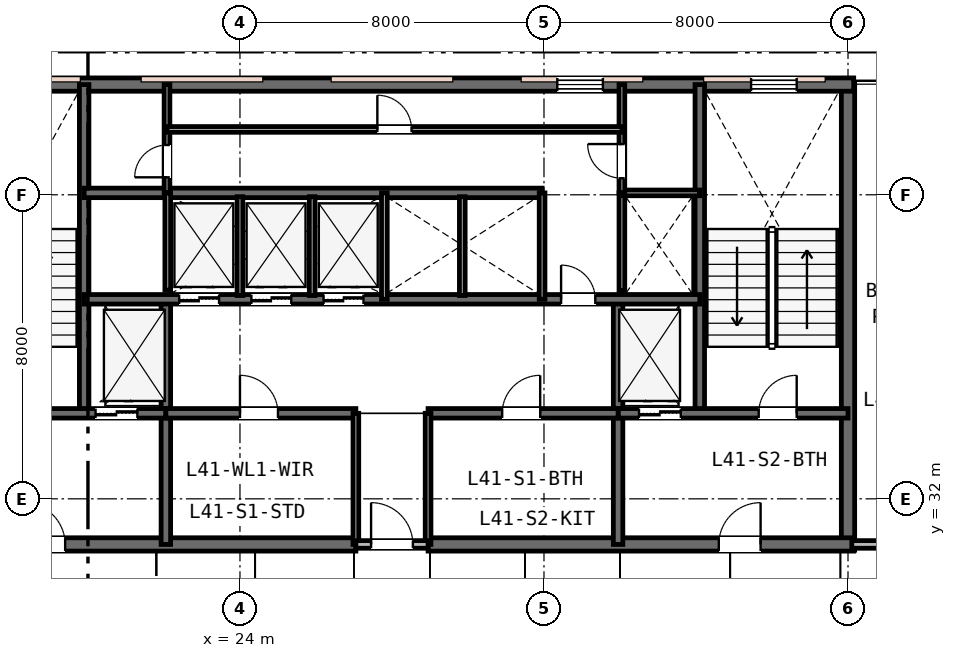
"""IFC4 building model, lengths in metres.
Left out: names, types, materials, properties, quantities, classifications, styles, units other than length and angle.
Written with IfcOpenShell. Run it as: python <this file> out.ifc"""

import sys

from ifc_helpers import new_model, si_unit, direction, frame, frame_2d, origin, place, context, subcontext, project, spatial, rectangle, extrude, element, fill, save


model = new_model("IFC4")
c1 = context("Model", 3, precision=1e-05, world=origin(), true_north=direction((0.0, 1.0)))
c2 = subcontext(c1, "Body", "Model", "MODEL_VIEW")
j1 = project(units=[si_unit("LENGTHUNIT", "METRE"), si_unit("PLANEANGLEUNIT", "RADIAN")], contexts=[c1])
p1 = place(None, origin())
s1 = spatial("IfcSite", under=j1, at=p1, CompositionType="ELEMENT")
p2 = place(p1, origin())
s2 = spatial("IfcBuilding", under=s1, at=p2, CompositionType="ELEMENT")
p3 = place(p2, frame((0.0, 0.0, 161.4)))
s3 = spatial("IfcBuildingStorey", under=s2, at=p3, CompositionType="ELEMENT", Elevation=161.4)
p4 = place(p3, frame((40.0, 30.65, 0.0), z_axis=(0.0, 0.0, 1.0), x_axis=(0.0, 1.0, 0.0)))
e1 = element("IfcWall", 1, at=p4, inside=s3, PredefinedType="SHEAR", context=c2, shape_type="SweptSolid", body=[
    extrude(rectangle(XDim=12.3, YDim=0.35, at=frame_2d((6.15, 0.0))), origin(), (0.0, 0.0, 1.0), 3.6),
])
p5 = place(p3, frame((15.85, 42.9, 0.0), z_axis=(0.0, 0.0, 1.0), x_axis=(1.0, 0.0, 0.0)))
e2 = element("IfcWall", 2, at=p5, inside=s3, PredefinedType="SHEAR", context=c2, shape_type="SweptSolid", body=[
    extrude(rectangle(XDim=24.3, YDim=0.35, at=frame_2d((12.15, 0.0))), origin(), (0.0, 0.0, 1.0), 3.6),
])
p6 = place(p5, frame((1.6, 0.0, 0.95)))
e3 = element("IfcOpeningElement", 3, at=p6, cuts=e2, PredefinedType="OPENING", context=c2, shape_type="SweptSolid", body=[
    extrude(rectangle(XDim=1.2, YDim=1.6, at=frame_2d((0.6, 0.8))), frame((0.0, 0.185, 0.0), z_axis=(0.0, -1.0, 0.0), x_axis=(1.0, 0.0, 0.0)), (0.0, 0.0, 1.0), 0.37),
])
p7 = place(p5, frame((16.5, 0.0, 0.95)))
e4 = element("IfcOpeningElement", 4, at=p7, cuts=e2, PredefinedType="OPENING", context=c2, shape_type="SweptSolid", body=[
    extrude(rectangle(XDim=1.2, YDim=1.6, at=frame_2d((0.6, 0.8))), frame((0.0, 0.185, 0.0), z_axis=(0.0, -1.0, 0.0), x_axis=(1.0, 0.0, 0.0)), (0.0, 0.0, 1.0), 0.37),
])
p8 = place(p5, frame((21.6, 0.0, 0.95)))
e5 = element("IfcOpeningElement", 5, at=p8, cuts=e2, PredefinedType="OPENING", context=c2, shape_type="SweptSolid", body=[
    extrude(rectangle(XDim=1.2, YDim=1.6, at=frame_2d((0.6, 0.8))), frame((0.0, 0.185, 0.0), z_axis=(0.0, -1.0, 0.0), x_axis=(1.0, 0.0, 0.0)), (0.0, 0.0, 1.0), 0.37),
])
p9 = place(p3, frame((15.85, 30.8, 0.0), z_axis=(0.0, 0.0, 1.0), x_axis=(1.0, 0.0, 0.0)))
e6 = element("IfcWall", 6, at=p9, inside=s3, PredefinedType="SHEAR", context=c2, shape_type="SweptSolid", body=[
    extrude(rectangle(XDim=11.2, YDim=0.35, at=frame_2d((5.6, 0.0))), origin(), (0.0, 0.0, 1.0), 3.6),
])
p10 = place(p9, frame((2.45, 0.0, 0.0)))
e7 = element("IfcOpeningElement", 7, at=p10, cuts=e6, PredefinedType="OPENING", context=c2, shape_type="SweptSolid", body=[
    extrude(rectangle(XDim=1.1, YDim=2.15, at=frame_2d((0.55, 1.075))), frame((0.0, 0.185, 0.0), z_axis=(0.0, -1.0, 0.0), x_axis=(1.0, 0.0, 0.0)), (0.0, 0.0, 1.0), 0.37),
])
p11 = place(p3, frame((28.95, 30.8, 0.0), z_axis=(0.0, 0.0, 1.0), x_axis=(1.0, 0.0, 0.0)))
e8 = element("IfcWall", 8, at=p11, inside=s3, PredefinedType="SHEAR", context=c2, shape_type="SweptSolid", body=[
    extrude(rectangle(XDim=11.2, YDim=0.35, at=frame_2d((5.6, 0.0))), origin(), (0.0, 0.0, 1.0), 3.6),
])
p12 = place(p11, frame((7.65, 0.0, 0.0)))
e9 = element("IfcOpeningElement", 9, at=p12, cuts=e8, PredefinedType="OPENING", context=c2, shape_type="SweptSolid", body=[
    extrude(rectangle(XDim=1.1, YDim=2.15, at=frame_2d((0.55, 1.075))), frame((0.0, 0.185, 0.0), z_axis=(0.0, -1.0, 0.0), x_axis=(1.0, 0.0, 0.0)), (0.0, 0.0, 1.0), 0.37),
])
for number, where, z_axis, x_axis in (
    (10, (19.9, 34.25, 0.0), (0.0, 0.0, 1.0), (0.0, 1.0, 0.0)),
    (11, (36.1, 34.25, 0.0), (0.0, 0.0, 1.0), (0.0, 1.0, 0.0)),
):
    element("IfcWall", number, at=place(p3, frame(where, z_axis=z_axis, x_axis=x_axis)), inside=s3, PredefinedType="SHEAR", context=c2, shape_type="SweptSolid", body=[
        extrude(rectangle(XDim=8.65, YDim=0.25, at=frame_2d((4.325, 0.0))), origin(), (0.0, 0.0, 1.0), 3.6),
    ])
for number, where, z_axis, x_axis in (
    (12, (22.05, 30.8, 0.0), (0.0, 0.0, 1.0), (0.0, 1.0, 0.0)),
    (13, (33.95, 30.8, 0.0), (0.0, 0.0, 1.0), (0.0, 1.0, 0.0)),
):
    element("IfcWall", number, at=place(p3, frame(where, z_axis=z_axis, x_axis=x_axis)), inside=s3, PredefinedType="SHEAR", context=c2, shape_type="SweptSolid", body=[
        extrude(rectangle(XDim=6.45, YDim=0.25, at=frame_2d((3.225, 0.0))), origin(), (0.0, 0.0, 1.0), 3.6),
    ])
p13 = place(p3, frame((16.0, 34.25, 0.0), z_axis=(0.0, 0.0, 1.0), x_axis=(1.0, 0.0, 0.0)))
e14 = element("IfcWall", 14, at=p13, inside=s3, PredefinedType="SHEAR", context=c2, shape_type="SweptSolid", body=[
    extrude(rectangle(XDim=6.05, YDim=0.25, at=frame_2d((3.025, 0.0))), origin(), (0.0, 0.0, 1.0), 3.6),
])
p14 = place(p13, frame((1.25, 0.0, 0.0)))
e15 = element("IfcOpeningElement", 15, at=p14, cuts=e14, PredefinedType="OPENING", context=c2, shape_type="SweptSolid", body=[
    extrude(rectangle(XDim=1.0, YDim=2.15, at=frame_2d((0.5, 1.075))), frame((0.0, 0.135, 0.0), z_axis=(0.0, -1.0, 0.0), x_axis=(1.0, 0.0, 0.0)), (0.0, 0.0, 1.0), 0.27),
])
p15 = place(p13, frame((4.2, 0.0, 0.0)))
e16 = element("IfcOpeningElement", 16, at=p15, cuts=e14, PredefinedType="OPENING", context=c2, shape_type="SweptSolid", body=[
    extrude(rectangle(XDim=1.1, YDim=2.15, at=frame_2d((0.55, 1.075))), frame((0.0, 0.135, 0.0), z_axis=(0.0, -1.0, 0.0), x_axis=(1.0, 0.0, 0.0)), (0.0, 0.0, 1.0), 0.27),
])
p16 = place(p3, frame((33.95, 34.25, 0.0), z_axis=(0.0, 0.0, 1.0), x_axis=(1.0, 0.0, 0.0)))
e17 = element("IfcWall", 17, at=p16, inside=s3, PredefinedType="SHEAR", context=c2, shape_type="SweptSolid", body=[
    extrude(rectangle(XDim=6.05, YDim=0.25, at=frame_2d((3.025, 0.0))), origin(), (0.0, 0.0, 1.0), 3.6),
])
p17 = place(p16, frame((3.7, 0.0, 0.0)))
e18 = element("IfcOpeningElement", 18, at=p17, cuts=e17, PredefinedType="OPENING", context=c2, shape_type="SweptSolid", body=[
    extrude(rectangle(XDim=1.0, YDim=2.15, at=frame_2d((0.5, 1.075))), frame((0.0, 0.135, 0.0), z_axis=(0.0, -1.0, 0.0), x_axis=(1.0, 0.0, 0.0)), (0.0, 0.0, 1.0), 0.27),
])
p18 = place(p16, frame((0.55, 0.0, 0.0)))
e19 = element("IfcOpeningElement", 19, at=p18, cuts=e17, PredefinedType="OPENING", context=c2, shape_type="SweptSolid", body=[
    extrude(rectangle(XDim=1.1, YDim=2.15, at=frame_2d((0.55, 1.075))), frame((0.0, 0.135, 0.0), z_axis=(0.0, -1.0, 0.0), x_axis=(1.0, 0.0, 0.0)), (0.0, 0.0, 1.0), 0.27),
])
p19 = place(p3, frame((22.05, 34.25, 0.0), z_axis=(0.0, 0.0, 1.0), x_axis=(1.0, 0.0, 0.0)))
e20 = element("IfcWall", 20, at=p19, inside=s3, PredefinedType="SHEAR", context=c2, shape_type="SweptSolid", body=[
    extrude(rectangle(XDim=5.0, YDim=0.25, at=frame_2d((2.5, 0.0))), origin(), (0.0, 0.0, 1.0), 3.6),
])
p20 = place(p19, frame((1.95, 0.0, 0.0)))
e21 = element("IfcOpeningElement", 21, at=p20, cuts=e20, PredefinedType="OPENING", context=c2, shape_type="SweptSolid", body=[
    extrude(rectangle(XDim=1.0, YDim=2.15, at=frame_2d((0.5, 1.075))), frame((0.0, 0.135, 0.0), z_axis=(0.0, -1.0, 0.0), x_axis=(1.0, 0.0, 0.0)), (0.0, 0.0, 1.0), 0.27),
])
p21 = place(p3, frame((28.95, 34.25, 0.0), z_axis=(0.0, 0.0, 1.0), x_axis=(1.0, 0.0, 0.0)))
e22 = element("IfcWall", 22, at=p21, inside=s3, PredefinedType="SHEAR", context=c2, shape_type="SweptSolid", body=[
    extrude(rectangle(XDim=5.0, YDim=0.25, at=frame_2d((2.5, 0.0))), origin(), (0.0, 0.0, 1.0), 3.6),
])
p22 = place(p21, frame((1.95, 0.0, 0.0)))
e23 = element("IfcOpeningElement", 23, at=p22, cuts=e22, PredefinedType="OPENING", context=c2, shape_type="SweptSolid", body=[
    extrude(rectangle(XDim=1.0, YDim=2.15, at=frame_2d((0.5, 1.075))), frame((0.0, 0.135, 0.0), z_axis=(0.0, -1.0, 0.0), x_axis=(1.0, 0.0, 0.0)), (0.0, 0.0, 1.0), 0.27),
])
p23 = place(p3, frame((19.9, 37.25, 0.0), z_axis=(0.0, 0.0, 1.0), x_axis=(1.0, 0.0, 0.0)))
e24 = element("IfcWall", 24, at=p23, inside=s3, PredefinedType="SHEAR", context=c2, shape_type="SweptSolid", body=[
    extrude(rectangle(XDim=16.2, YDim=0.25, at=frame_2d((8.1, 0.0))), origin(), (0.0, 0.0, 1.0), 3.6),
])
p24 = place(p23, frame((12.55, 0.0, 0.0)))
e25 = element("IfcOpeningElement", 25, at=p24, cuts=e24, PredefinedType="OPENING", context=c2, shape_type="SweptSolid", body=[
    extrude(rectangle(XDim=0.9, YDim=2.15, at=frame_2d((0.45, 1.075))), frame((0.0, 0.135, 0.0), z_axis=(0.0, -1.0, 0.0), x_axis=(1.0, 0.0, 0.0)), (0.0, 0.0, 1.0), 0.27),
])
p25 = place(p23, frame((2.5, 0.0, 0.0)))
e26 = element("IfcOpeningElement", 26, at=p25, cuts=e24, PredefinedType="OPENING", context=c2, shape_type="SweptSolid", body=[
    extrude(rectangle(XDim=1.05, YDim=2.15, at=frame_2d((0.525, 1.075))), frame((0.0, 0.135, 0.0), z_axis=(0.0, -1.0, 0.0), x_axis=(1.0, 0.0, 0.0)), (0.0, 0.0, 1.0), 0.27),
])
p26 = place(p23, frame((4.4, 0.0, 0.0)))
e27 = element("IfcOpeningElement", 27, at=p26, cuts=e24, PredefinedType="OPENING", context=c2, shape_type="SweptSolid", body=[
    extrude(rectangle(XDim=1.05, YDim=2.15, at=frame_2d((0.525, 1.075))), frame((0.0, 0.135, 0.0), z_axis=(0.0, -1.0, 0.0), x_axis=(1.0, 0.0, 0.0)), (0.0, 0.0, 1.0), 0.27),
])
p27 = place(p23, frame((6.3, 0.0, 0.0)))
e28 = element("IfcOpeningElement", 28, at=p27, cuts=e24, PredefinedType="OPENING", context=c2, shape_type="SweptSolid", body=[
    extrude(rectangle(XDim=1.05, YDim=2.15, at=frame_2d((0.525, 1.075))), frame((0.0, 0.135, 0.0), z_axis=(0.0, -1.0, 0.0), x_axis=(1.0, 0.0, 0.0)), (0.0, 0.0, 1.0), 0.27),
])
p28 = place(p3, frame((19.9, 40.05, 0.0), z_axis=(0.0, 0.0, 1.0), x_axis=(1.0, 0.0, 0.0)))
e29 = element("IfcWall", 29, at=p28, inside=s3, PredefinedType="SHEAR", context=c2, shape_type="SweptSolid", body=[
    extrude(rectangle(XDim=12.05, YDim=0.25, at=frame_2d((6.025, 0.0))), origin(), (0.0, 0.0, 1.0), 3.6),
])
for number, where, z_axis, x_axis in (
    (30, (27.05, 30.8, 0.0), (0.0, 0.0, 1.0), (0.0, 1.0, 0.0)),
    (31, (28.95, 30.8, 0.0), (0.0, 0.0, 1.0), (0.0, 1.0, 0.0)),
):
    element("IfcWall", number, at=place(p3, frame(where, z_axis=z_axis, x_axis=x_axis)), inside=s3, PredefinedType="PLUMBINGWALL", context=c2, shape_type="SweptSolid", body=[
        extrude(rectangle(XDim=3.45, YDim=0.15, at=frame_2d((1.725, 0.0))), origin(), (0.0, 0.0, 1.0), 2.96),
    ])
p29 = place(p3, frame((27.05, 30.8, 0.0), z_axis=(0.0, 0.0, 1.0), x_axis=(1.0, 0.0, 0.0)))
e32 = element("IfcWall", 32, at=p29, inside=s3, PredefinedType="PARTITIONING", context=c2, shape_type="SweptSolid", body=[
    extrude(rectangle(XDim=1.9, YDim=0.2, at=frame_2d((0.95, 0.0))), origin(), (0.0, 0.0, 1.0), 2.96),
])
p30 = place(p29, frame((0.4, 0.0, 0.0)))
e33 = element("IfcOpeningElement", 33, at=p30, cuts=e32, PredefinedType="OPENING", context=c2, shape_type="SweptSolid", body=[
    extrude(rectangle(XDim=1.1, YDim=2.15, at=frame_2d((0.55, 1.075))), frame((0.0, 0.11, 0.0), z_axis=(0.0, -1.0, 0.0), x_axis=(1.0, 0.0, 0.0)), (0.0, 0.0, 1.0), 0.22),
])
p31 = place(p3, frame((22.1, 37.49, 0.0), z_axis=(0.0, 0.0, 1.0), x_axis=(0.0, 1.0, 0.0)))
e34 = element("IfcWall", 34, at=p31, inside=s3, PredefinedType="PLUMBINGWALL", context=c2, shape_type="SweptSolid", body=[
    extrude(rectangle(XDim=2.56, YDim=0.15, at=frame_2d((1.28, 0.0))), origin(), (0.0, 0.0, 1.0), 3.33),
])
p32 = place(p3, frame((27.8, 37.25, 0.0), z_axis=(0.0, 0.0, 1.0), x_axis=(0.0, 1.0, 0.0)))
e35 = element("IfcWall", 35, at=p32, inside=s3, PredefinedType="PLUMBINGWALL", context=c2, shape_type="SweptSolid", body=[
    extrude(rectangle(XDim=2.8, YDim=0.15, at=frame_2d((1.4, 0.0))), origin(), (0.0, 0.0, 1.0), 3.33),
])
for number, where, z_axis, x_axis in (
    (36, (24.0, 37.35, 0.0), (0.0, 0.0, 1.0), (0.0, 1.0, 0.0)),
    (37, (25.9, 37.35, 0.0), (0.0, 0.0, 1.0), (0.0, 1.0, 0.0)),
):
    element("IfcWall", number, at=place(p3, frame(where, z_axis=z_axis, x_axis=x_axis)), inside=s3, PredefinedType="PLUMBINGWALL", context=c2, shape_type="SweptSolid", body=[
        extrude(rectangle(XDim=2.6, YDim=0.15, at=frame_2d((1.3, 0.0))), origin(), (0.0, 0.0, 1.0), 3.33),
    ])
p33 = place(p3, frame((31.95, 37.25, 0.0), z_axis=(0.0, 0.0, 1.0), x_axis=(0.0, 1.0, 0.0)))
e38 = element("IfcWall", 38, at=p33, inside=s3, PredefinedType="PLUMBINGWALL", context=c2, shape_type="SweptSolid", body=[
    extrude(rectangle(XDim=2.8, YDim=0.15, at=frame_2d((1.4, 0.0))), origin(), (0.0, 0.0, 1.0), 3.33),
])
p34 = place(p3, frame((29.85, 37.35, 0.0), z_axis=(0.0, 0.0, 1.0), x_axis=(0.0, 1.0, 0.0)))
e39 = element("IfcWall", 39, at=p34, inside=s3, PredefinedType="PLUMBINGWALL", context=c2, shape_type="SweptSolid", body=[
    extrude(rectangle(XDim=2.6, YDim=0.15, at=frame_2d((1.3, 0.0))), origin(), (0.0, 0.0, 1.0), 3.33),
])
p35 = place(p3, frame((34.05, 37.473, 0.0), z_axis=(0.0, 0.0, 1.0), x_axis=(0.0, 1.0, 0.0)))
e40 = element("IfcWall", 40, at=p35, inside=s3, PredefinedType="PLUMBINGWALL", context=c2, shape_type="SweptSolid", body=[
    extrude(rectangle(XDim=2.577, YDim=0.15, at=frame_2d((1.288, 0.0))), origin(), (0.0, 0.0, 1.0), 3.33),
])
p36 = place(p3, frame((34.05, 40.05, 0.0), z_axis=(0.0, 0.0, 1.0), x_axis=(1.0, 0.0, 0.0)))
e41 = element("IfcWall", 41, at=p36, inside=s3, PredefinedType="PARTITIONING", context=c2, shape_type="SweptSolid", body=[
    extrude(rectangle(XDim=2.05, YDim=0.15, at=frame_2d((1.025, 0.0))), origin(), (0.0, 0.0, 1.0), 3.33),
])
p37 = place(p3, frame((34.05, 40.05, 0.0), z_axis=(0.0, 0.0, 1.0), x_axis=(0.0, 1.0, 0.0)))
e42 = element("IfcWall", 42, at=p37, inside=s3, PredefinedType="PARTITIONING", context=c2, shape_type="SweptSolid", body=[
    extrude(rectangle(XDim=2.85, YDim=0.15, at=frame_2d((1.425, 0.0))), origin(), (0.0, 0.0, 1.0), 3.33),
])
p38 = place(p37, frame((0.385, 0.0, 0.0)))
e43 = element("IfcOpeningElement", 43, at=p38, cuts=e42, PredefinedType="OPENING", context=c2, shape_type="SweptSolid", body=[
    extrude(rectangle(XDim=0.9, YDim=2.15, at=frame_2d((0.45, 1.075))), frame((0.0, 0.085, 0.0), z_axis=(0.0, -1.0, 0.0), x_axis=(1.0, 0.0, 0.0)), (0.0, 0.0, 1.0), 0.17),
])
p39 = place(p3, frame((22.08, 40.05, 0.0), z_axis=(0.0, 0.0, 1.0), x_axis=(0.0, 1.0, 0.0)))
e44 = element("IfcWall", 44, at=p39, inside=s3, PredefinedType="PARTITIONING", context=c2, shape_type="SweptSolid", body=[
    extrude(rectangle(XDim=2.85, YDim=0.15, at=frame_2d((1.425, 0.0))), origin(), (0.0, 0.0, 1.0), 3.33),
])
p40 = place(p39, frame((0.41, 0.0, 0.0)))
e45 = element("IfcOpeningElement", 45, at=p40, cuts=e44, PredefinedType="OPENING", context=c2, shape_type="SweptSolid", body=[
    extrude(rectangle(XDim=0.85, YDim=2.15, at=frame_2d((0.425, 1.075))), frame((0.0, 0.085, 0.0), z_axis=(0.0, -1.0, 0.0), x_axis=(1.0, 0.0, 0.0)), (0.0, 0.0, 1.0), 0.17),
])
p41 = place(p3, frame((22.08, 41.72, 0.0), z_axis=(0.0, 0.0, 1.0), x_axis=(1.0, 0.0, 0.0)))
e46 = element("IfcWall", 46, at=p41, inside=s3, PredefinedType="PARTITIONING", context=c2, shape_type="SweptSolid", body=[
    extrude(rectangle(XDim=11.97, YDim=0.15, at=frame_2d((5.985, 0.0))), origin(), (0.0, 0.0, 1.0), 3.33),
])
p42 = place(p41, frame((5.535, 0.0, 0.0)))
e47 = element("IfcOpeningElement", 47, at=p42, cuts=e46, PredefinedType="OPENING", context=c2, shape_type="SweptSolid", body=[
    extrude(rectangle(XDim=0.9, YDim=2.15, at=frame_2d((0.45, 1.075))), frame((0.0, 0.085, 0.0), z_axis=(0.0, -1.0, 0.0), x_axis=(1.0, 0.0, 0.0)), (0.0, 0.0, 1.0), 0.17),
])
p43 = place(p3, frame((40.1, 30.8, 0.0), z_axis=(0.0, 0.0, 1.0), x_axis=(1.0, 0.0, 0.0)))
e48 = element("IfcWall", 48, at=p43, inside=s3, PredefinedType="PARTITIONING", context=c2, shape_type="SweptSolid", body=[
    extrude(rectangle(XDim=4.1, YDim=0.2, at=frame_2d((2.05, 0.0))), origin(), (0.0, 0.0, 1.0), 2.93),
])
p44 = place(p43, frame((1.575, 0.0, 0.0)))
e49 = element("IfcOpeningElement", 49, at=p44, cuts=e48, PredefinedType="OPENING", context=c2, shape_type="SweptSolid", body=[
    extrude(rectangle(XDim=0.95, YDim=2.15, at=frame_2d((0.475, 1.075))), frame((0.0, 0.11, 0.0), z_axis=(0.0, -1.0, 0.0), x_axis=(1.0, 0.0, 0.0)), (0.0, 0.0, 1.0), 0.22),
])
p45 = place(p7, origin())
e50 = element("IfcWindow", 50, at=p45, inside=s3, PartitioningType="SINGLE_PANEL", PredefinedType="WINDOW", context=c2, shape_type="SweptSolid", body=[
    extrude(rectangle(XDim=1.2, YDim=1.6, at=frame_2d((0.6, 0.8))), frame((0.0, 0.03, 0.0), z_axis=(0.0, -1.0, 0.0), x_axis=(1.0, 0.0, 0.0)), (0.0, 0.0, 1.0), 0.06),
])
fill(e4, e50)
p46 = place(p8, origin())
e51 = element("IfcWindow", 51, at=p46, inside=s3, PartitioningType="SINGLE_PANEL", PredefinedType="WINDOW", context=c2, shape_type="SweptSolid", body=[
    extrude(rectangle(XDim=1.2, YDim=1.6, at=frame_2d((0.6, 0.8))), frame((0.0, 0.03, 0.0), z_axis=(0.0, -1.0, 0.0), x_axis=(1.0, 0.0, 0.0)), (0.0, 0.0, 1.0), 0.06),
])
fill(e5, e51)
p47 = place(p30, origin())
e52 = element("IfcDoor", 52, at=p47, inside=s3, OperationType="SINGLE_SWING_LEFT", PredefinedType="DOOR", context=c2, shape_type="SweptSolid", body=[
    extrude(rectangle(XDim=1.1, YDim=2.15, at=frame_2d((0.55, 1.075))), frame((0.0, 0.025, 0.0), z_axis=(0.0, -1.0, 0.0), x_axis=(1.0, 0.0, 0.0)), (0.0, 0.0, 1.0), 0.05),
])
fill(e33, e52)
p48 = place(p17, origin())
e53 = element("IfcDoor", 53, at=p48, inside=s3, OperationType="SINGLE_SWING_RIGHT", PredefinedType="DOOR", context=c2, shape_type="SweptSolid", body=[
    extrude(rectangle(XDim=1.0, YDim=2.15, at=frame_2d((0.5, 1.075))), frame((0.0, 0.025, 0.0), z_axis=(0.0, -1.0, 0.0), x_axis=(1.0, 0.0, 0.0)), (0.0, 0.0, 1.0), 0.05),
])
fill(e18, e53)
p49 = place(p10, origin())
e54 = element("IfcDoor", 54, at=p49, inside=s3, OperationType="SINGLE_SWING_LEFT", PredefinedType="DOOR", context=c2, shape_type="SweptSolid", body=[
    extrude(rectangle(XDim=1.1, YDim=2.15, at=frame_2d((0.55, 1.075))), frame((0.0, 0.025, 0.0), z_axis=(0.0, -1.0, 0.0), x_axis=(1.0, 0.0, 0.0)), (0.0, 0.0, 1.0), 0.05),
])
fill(e7, e54)
p50 = place(p12, origin())
e55 = element("IfcDoor", 55, at=p50, inside=s3, OperationType="SINGLE_SWING_RIGHT", PredefinedType="DOOR", context=c2, shape_type="SweptSolid", body=[
    extrude(rectangle(XDim=1.1, YDim=2.15, at=frame_2d((0.55, 1.075))), frame((0.0, 0.025, 0.0), z_axis=(0.0, -1.0, 0.0), x_axis=(1.0, 0.0, 0.0)), (0.0, 0.0, 1.0), 0.05),
])
fill(e9, e55)
p51 = place(p20, origin())
e56 = element("IfcDoor", 56, at=p51, inside=s3, OperationType="SINGLE_SWING_LEFT", PredefinedType="DOOR", context=c2, shape_type="SweptSolid", body=[
    extrude(rectangle(XDim=1.0, YDim=2.15, at=frame_2d((0.5, 1.075))), frame((0.0, 0.025, 0.0), z_axis=(0.0, -1.0, 0.0), x_axis=(1.0, 0.0, 0.0)), (0.0, 0.0, 1.0), 0.05),
])
fill(e21, e56)
p52 = place(p22, origin())
e57 = element("IfcDoor", 57, at=p52, inside=s3, OperationType="SINGLE_SWING_RIGHT", PredefinedType="DOOR", context=c2, shape_type="SweptSolid", body=[
    extrude(rectangle(XDim=1.0, YDim=2.15, at=frame_2d((0.5, 1.075))), frame((0.0, 0.025, 0.0), z_axis=(0.0, -1.0, 0.0), x_axis=(1.0, 0.0, 0.0)), (0.0, 0.0, 1.0), 0.05),
])
fill(e23, e57)
p53 = place(p24, origin())
e58 = element("IfcDoor", 58, at=p53, inside=s3, OperationType="SINGLE_SWING_LEFT", PredefinedType="DOOR", context=c2, shape_type="SweptSolid", body=[
    extrude(rectangle(XDim=0.9, YDim=2.15, at=frame_2d((0.45, 1.075))), frame((0.0, 0.025, 0.0), z_axis=(0.0, -1.0, 0.0), x_axis=(1.0, 0.0, 0.0)), (0.0, 0.0, 1.0), 0.05),
])
fill(e25, e58)
p54 = place(p38, origin())
e59 = element("IfcDoor", 59, at=p54, inside=s3, OperationType="SINGLE_SWING_RIGHT", PredefinedType="DOOR", context=c2, shape_type="SweptSolid", body=[
    extrude(rectangle(XDim=0.9, YDim=2.15, at=frame_2d((0.45, 1.075))), frame((0.0, 0.025, 0.0), z_axis=(0.0, -1.0, 0.0), x_axis=(1.0, 0.0, 0.0)), (0.0, 0.0, 1.0), 0.05),
])
fill(e43, e59)
p55 = place(p40, origin())
e60 = element("IfcDoor", 60, at=p55, inside=s3, OperationType="SINGLE_SWING_LEFT", PredefinedType="DOOR", context=c2, shape_type="SweptSolid", body=[
    extrude(rectangle(XDim=0.85, YDim=2.15, at=frame_2d((0.425, 1.075))), frame((0.0, 0.025, 0.0), z_axis=(0.0, -1.0, 0.0), x_axis=(1.0, 0.0, 0.0)), (0.0, 0.0, 1.0), 0.05),
])
fill(e45, e60)
p56 = place(p42, origin())
e61 = element("IfcDoor", 61, at=p56, inside=s3, OperationType="SINGLE_SWING_LEFT", PredefinedType="DOOR", context=c2, shape_type="SweptSolid", body=[
    extrude(rectangle(XDim=0.9, YDim=2.15, at=frame_2d((0.45, 1.075))), frame((0.0, 0.025, 0.0), z_axis=(0.0, -1.0, 0.0), x_axis=(1.0, 0.0, 0.0)), (0.0, 0.0, 1.0), 0.05),
])
fill(e47, e61)
p57 = place(p15, origin())
e62 = element("IfcDoor", 62, at=p57, inside=s3, OperationType="DOUBLE_DOOR_SLIDING", PredefinedType="DOOR", context=c2, shape_type="SweptSolid", body=[
    extrude(rectangle(XDim=1.1, YDim=2.15, at=frame_2d((0.55, 1.075))), frame((0.0, 0.025, 0.0), z_axis=(0.0, -1.0, 0.0), x_axis=(1.0, 0.0, 0.0)), (0.0, 0.0, 1.0), 0.05),
])
fill(e16, e62)
p58 = place(p18, origin())
e63 = element("IfcDoor", 63, at=p58, inside=s3, OperationType="DOUBLE_DOOR_SLIDING", PredefinedType="DOOR", context=c2, shape_type="SweptSolid", body=[
    extrude(rectangle(XDim=1.1, YDim=2.15, at=frame_2d((0.55, 1.075))), frame((0.0, 0.025, 0.0), z_axis=(0.0, -1.0, 0.0), x_axis=(1.0, 0.0, 0.0)), (0.0, 0.0, 1.0), 0.05),
])
fill(e19, e63)
p59 = place(p25, origin())
e64 = element("IfcDoor", 64, at=p59, inside=s3, OperationType="DOUBLE_DOOR_SLIDING", PredefinedType="DOOR", context=c2, shape_type="SweptSolid", body=[
    extrude(rectangle(XDim=1.05, YDim=2.15, at=frame_2d((0.525, 1.075))), frame((0.0, 0.025, 0.0), z_axis=(0.0, -1.0, 0.0), x_axis=(1.0, 0.0, 0.0)), (0.0, 0.0, 1.0), 0.05),
])
fill(e26, e64)
p60 = place(p26, origin())
e65 = element("IfcDoor", 65, at=p60, inside=s3, OperationType="DOUBLE_DOOR_SLIDING", PredefinedType="DOOR", context=c2, shape_type="SweptSolid", body=[
    extrude(rectangle(XDim=1.05, YDim=2.15, at=frame_2d((0.525, 1.075))), frame((0.0, 0.025, 0.0), z_axis=(0.0, -1.0, 0.0), x_axis=(1.0, 0.0, 0.0)), (0.0, 0.0, 1.0), 0.05),
])
fill(e27, e65)
p61 = place(p27, origin())
e66 = element("IfcDoor", 66, at=p61, inside=s3, OperationType="DOUBLE_DOOR_SLIDING", PredefinedType="DOOR", context=c2, shape_type="SweptSolid", body=[
    extrude(rectangle(XDim=1.05, YDim=2.15, at=frame_2d((0.525, 1.075))), frame((0.0, 0.025, 0.0), z_axis=(0.0, -1.0, 0.0), x_axis=(1.0, 0.0, 0.0)), (0.0, 0.0, 1.0), 0.05),
])
fill(e28, e66)
save(model, sys.argv[1])
